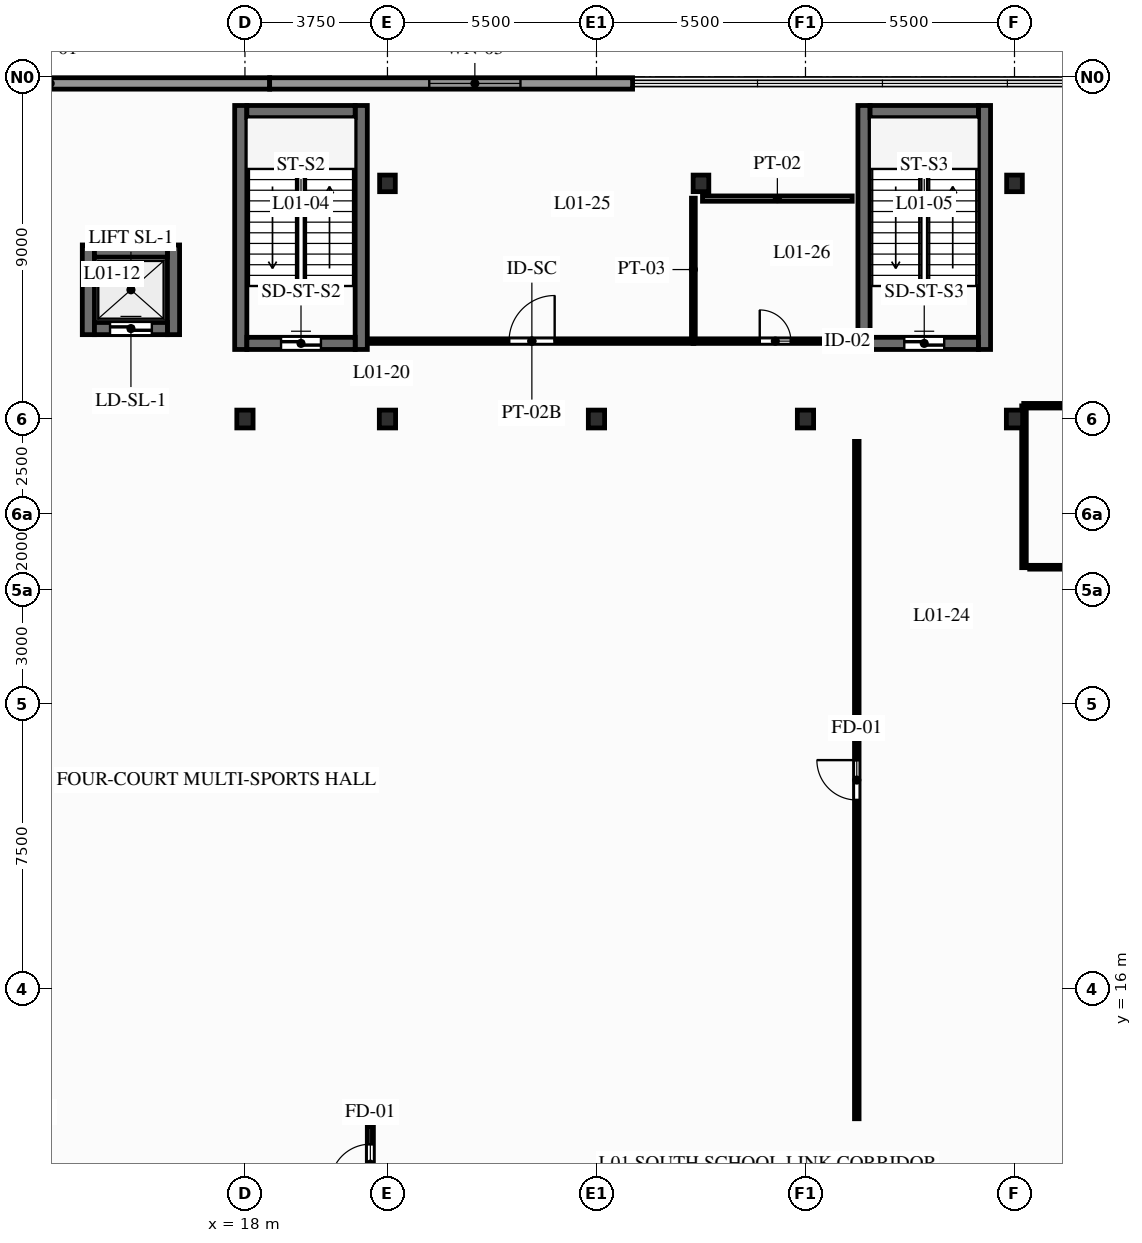
"""IFC4 building model, lengths in metres.
Left out: names, types, materials, properties, quantities, classifications, styles, units other than length and angle.
Written with IfcOpenShell. Run it as: python <this file> out.ifc"""

import sys

from ifc_helpers import new_model, si_unit, direction, frame, frame_2d, origin, origin_2d, place, context, subcontext, project, spatial, rectangle, i_section, extrude, element, fill, save


model = new_model("IFC4")
c1 = context("Model", 3, precision=1e-05, world=origin(), true_north=direction((0.0, 1.0)))
c2 = subcontext(c1, "Body", "Model", "MODEL_VIEW")
j1 = project(units=[si_unit("LENGTHUNIT", "METRE"), si_unit("PLANEANGLEUNIT", "RADIAN")], contexts=[c1])
p1 = place(None, origin())
s1 = spatial("IfcSite", under=j1, at=p1, CompositionType="ELEMENT")
p2 = place(p1, origin())
s2 = spatial("IfcBuilding", under=s1, at=p2, CompositionType="ELEMENT")
p3 = place(p2, frame((0.0, 0.0, 4.5)))
s3 = spatial("IfcBuildingStorey", under=s2, at=p3, CompositionType="ELEMENT", Elevation=4.5)
for number, where, z_axis, x_axis in (
    (1, (18.0, 31.0, 0.0), (0.0, 0.0, 1.0), (1.0, 0.0, 0.0)),
    (2, (21.75, 31.0, 0.0), (0.0, 0.0, 1.0), (1.0, 0.0, 0.0)),
):
    element("IfcColumn", number, at=place(p3, frame(where, z_axis=z_axis, x_axis=x_axis)), inside=s3, PredefinedType="COLUMN", context=c2, shape_type="SweptSolid", body=[
        extrude(i_section(OverallWidth=0.428, OverallDepth=0.469, WebThickness=0.078, FlangeThickness=0.125, FilletRadius=0.015, at=origin_2d()), origin(), (0.0, 0.0, 1.0), 4.5),
    ])
p4 = place(p3, frame((21.75, 37.2, 0.0), z_axis=(0.0, 0.0, 1.0), x_axis=(1.0, 0.0, 0.0)))
e3 = element("IfcColumn", 3, at=p4, inside=s3, PredefinedType="COLUMN", context=c2, shape_type="SweptSolid", body=[
    extrude(i_section(OverallWidth=0.412, OverallDepth=0.437, WebThickness=0.036, FlangeThickness=0.058, FilletRadius=0.015, at=origin_2d()), origin(), (0.0, 0.0, 1.0), 4.5),
])
p5 = place(p3, frame((27.25, 31.0, 0.0), z_axis=(0.0, 0.0, 1.0), x_axis=(1.0, 0.0, 0.0)))
e4 = element("IfcColumn", 4, at=p5, inside=s3, PredefinedType="COLUMN", context=c2, shape_type="SweptSolid", body=[
    extrude(i_section(OverallWidth=0.428, OverallDepth=0.469, WebThickness=0.078, FlangeThickness=0.125, FilletRadius=0.015, at=origin_2d()), origin(), (0.0, 0.0, 1.0), 4.5),
])
p6 = place(p3, frame((30.0, 37.2, 0.0), z_axis=(0.0, 0.0, 1.0), x_axis=(1.0, 0.0, 0.0)))
e5 = element("IfcColumn", 5, at=p6, inside=s3, PredefinedType="COLUMN", context=c2, shape_type="SweptSolid", body=[
    extrude(i_section(OverallWidth=0.412, OverallDepth=0.437, WebThickness=0.036, FlangeThickness=0.058, FilletRadius=0.015, at=origin_2d()), origin(), (0.0, 0.0, 1.0), 4.5),
])
for number, where, z_axis, x_axis in (
    (6, (32.75, 31.0, 0.0), (0.0, 0.0, 1.0), (1.0, 0.0, 0.0)),
    (7, (38.25, 31.0, 0.0), (0.0, 0.0, 1.0), (1.0, 0.0, 0.0)),
):
    element("IfcColumn", number, at=place(p3, frame(where, z_axis=z_axis, x_axis=x_axis)), inside=s3, PredefinedType="COLUMN", context=c2, shape_type="SweptSolid", body=[
        extrude(i_section(OverallWidth=0.428, OverallDepth=0.469, WebThickness=0.078, FlangeThickness=0.125, FilletRadius=0.015, at=origin_2d()), origin(), (0.0, 0.0, 1.0), 4.5),
    ])
p7 = place(p3, frame((38.25, 37.2, 0.0), z_axis=(0.0, 0.0, 1.0), x_axis=(1.0, 0.0, 0.0)))
e8 = element("IfcColumn", 8, at=p7, inside=s3, PredefinedType="COLUMN", context=c2, shape_type="SweptSolid", body=[
    extrude(i_section(OverallWidth=0.412, OverallDepth=0.437, WebThickness=0.036, FlangeThickness=0.058, FilletRadius=0.015, at=origin_2d()), origin(), (0.0, 0.0, 1.0), 4.5),
])
p8 = place(p3, frame((7.1, 39.83, 0.0), z_axis=(0.0, 0.0, 1.0), x_axis=(1.0, 0.0, 0.0)))
e9 = element("IfcWall", 9, at=p8, inside=s3, PredefinedType="STANDARD", context=c2, shape_type="SweptSolid", body=[
    extrude(rectangle(XDim=11.55, YDim=0.3, at=frame_2d((5.775, 0.0))), origin(), (0.0, 0.0, 1.0), 4.22),
])
p9 = place(p3, frame((18.65, 39.83, 0.0), z_axis=(0.0, 0.0, 1.0), x_axis=(1.0, 0.0, 0.0)))
e10 = element("IfcWall", 10, at=p9, inside=s3, PredefinedType="STANDARD", context=c2, shape_type="SweptSolid", body=[
    extrude(rectangle(XDim=9.55, YDim=0.3, at=frame_2d((4.775, 0.0))), origin(), (0.0, 0.0, 1.0), 4.22),
])
p10 = place(p9, frame((4.2, 0.0, 0.9)))
e11 = element("IfcOpeningElement", 11, at=p10, cuts=e10, PredefinedType="OPENING", context=c2, shape_type="SweptSolid", body=[
    extrude(rectangle(XDim=2.4, YDim=2.15, at=frame_2d((1.2, 1.075))), frame((0.0, 0.16, 0.0), z_axis=(0.0, -1.0, 0.0), x_axis=(1.0, 0.0, 0.0)), (0.0, 0.0, 1.0), 0.32),
])
for number, where, z_axis, x_axis in (
    (12, (17.89, 32.83, 0.0), (0.0, 0.0, 1.0), (0.0, 1.0, 0.0)),
    (13, (21.06, 32.83, 0.0), (0.0, 0.0, 1.0), (0.0, 1.0, 0.0)),
):
    element("IfcWall", number, at=place(p3, frame(where, z_axis=z_axis, x_axis=x_axis)), inside=s3, PredefinedType="SHEAR", context=c2, shape_type="SweptSolid", body=[
        extrude(rectangle(XDim=6.42, YDim=0.32, at=frame_2d((3.21, 0.0))), origin(), (0.0, 0.0, 1.0), 4.22),
    ])
p11 = place(p3, frame((18.05, 32.99, 0.0), z_axis=(0.0, 0.0, 1.0), x_axis=(1.0, 0.0, 0.0)))
e14 = element("IfcWall", 14, at=p11, inside=s3, PredefinedType="SHEAR", context=c2, shape_type="SweptSolid", body=[
    extrude(rectangle(XDim=2.85, YDim=0.32, at=frame_2d((1.425, 0.0))), origin(), (0.0, 0.0, 1.0), 4.22),
])
p12 = place(p11, frame((0.9, 0.0, 0.0)))
e15 = element("IfcOpeningElement", 15, at=p12, cuts=e14, PredefinedType="OPENING", context=c2, shape_type="SweptSolid", body=[
    extrude(rectangle(XDim=1.05, YDim=2.06, at=frame_2d((0.525, 1.03))), frame((0.0, 0.17, 0.0), z_axis=(0.0, -1.0, 0.0), x_axis=(1.0, 0.0, 0.0)), (0.0, 0.0, 1.0), 0.34),
])
p13 = place(p3, frame((20.9, 39.09, 0.0), z_axis=(0.0, 0.0, 1.0), x_axis=(-1.0, 0.0, 0.0)))
e16 = element("IfcWall", 16, at=p13, inside=s3, PredefinedType="SHEAR", context=c2, shape_type="SweptSolid", body=[
    extrude(rectangle(XDim=2.85, YDim=0.32, at=frame_2d((1.425, 0.0))), origin(), (0.0, 0.0, 1.0), 4.22),
])
for number, where, z_axis, x_axis in (
    (17, (34.29, 32.83, 0.0), (0.0, 0.0, 1.0), (0.0, 1.0, 0.0)),
    (18, (37.46, 32.83, 0.0), (0.0, 0.0, 1.0), (0.0, 1.0, 0.0)),
):
    element("IfcWall", number, at=place(p3, frame(where, z_axis=z_axis, x_axis=x_axis)), inside=s3, PredefinedType="SHEAR", context=c2, shape_type="SweptSolid", body=[
        extrude(rectangle(XDim=6.42, YDim=0.32, at=frame_2d((3.21, 0.0))), origin(), (0.0, 0.0, 1.0), 4.22),
    ])
p14 = place(p3, frame((34.45, 32.99, 0.0), z_axis=(0.0, 0.0, 1.0), x_axis=(1.0, 0.0, 0.0)))
e19 = element("IfcWall", 19, at=p14, inside=s3, PredefinedType="SHEAR", context=c2, shape_type="SweptSolid", body=[
    extrude(rectangle(XDim=2.85, YDim=0.32, at=frame_2d((1.425, 0.0))), origin(), (0.0, 0.0, 1.0), 4.22),
])
p15 = place(p14, frame((0.9, 0.0, 0.0)))
e20 = element("IfcOpeningElement", 20, at=p15, cuts=e19, PredefinedType="OPENING", context=c2, shape_type="SweptSolid", body=[
    extrude(rectangle(XDim=1.05, YDim=2.06, at=frame_2d((0.525, 1.03))), frame((0.0, 0.17, 0.0), z_axis=(0.0, -1.0, 0.0), x_axis=(1.0, 0.0, 0.0)), (0.0, 0.0, 1.0), 0.34),
])
p16 = place(p3, frame((37.3, 39.09, 0.0), z_axis=(0.0, 0.0, 1.0), x_axis=(-1.0, 0.0, 0.0)))
e21 = element("IfcWall", 21, at=p16, inside=s3, PredefinedType="SHEAR", context=c2, shape_type="SweptSolid", body=[
    extrude(rectangle(XDim=2.85, YDim=0.32, at=frame_2d((1.425, 0.0))), origin(), (0.0, 0.0, 1.0), 4.22),
])
for number, where, z_axis, x_axis in (
    (22, (13.88, 33.22, 0.0), (0.0, 0.0, 1.0), (0.0, 1.0, 0.0)),
    (23, (16.12, 33.22, 0.0), (0.0, 0.0, 1.0), (0.0, 1.0, 0.0)),
):
    element("IfcWall", number, at=place(p3, frame(where, z_axis=z_axis, x_axis=x_axis)), inside=s3, PredefinedType="SHEAR", context=c2, shape_type="SweptSolid", body=[
        extrude(rectangle(XDim=2.36, YDim=0.32, at=frame_2d((1.18, 0.0))), origin(), (0.0, 0.0, 1.0), 4.22),
    ])
p17 = place(p3, frame((14.04, 33.38, 0.0), z_axis=(0.0, 0.0, 1.0), x_axis=(1.0, 0.0, 0.0)))
e24 = element("IfcWall", 24, at=p17, inside=s3, PredefinedType="SHEAR", context=c2, shape_type="SweptSolid", body=[
    extrude(rectangle(XDim=1.92, YDim=0.32, at=frame_2d((0.96, 0.0))), origin(), (0.0, 0.0, 1.0), 4.22),
])
p18 = place(p17, frame((0.41, 0.0, 0.0)))
e25 = element("IfcOpeningElement", 25, at=p18, cuts=e24, PredefinedType="OPENING", context=c2, shape_type="SweptSolid", body=[
    extrude(rectangle(XDim=1.1, YDim=2.06, at=frame_2d((0.55, 1.03))), frame((0.0, 0.17, 0.0), z_axis=(0.0, -1.0, 0.0), x_axis=(1.0, 0.0, 0.0)), (0.0, 0.0, 1.0), 0.34),
])
p19 = place(p3, frame((14.04, 35.42, 0.0), z_axis=(0.0, 0.0, 1.0), x_axis=(1.0, 0.0, 0.0)))
e26 = element("IfcWall", 26, at=p19, inside=s3, PredefinedType="SHEAR", context=c2, shape_type="SweptSolid", body=[
    extrude(rectangle(XDim=1.92, YDim=0.32, at=frame_2d((0.96, 0.0))), origin(), (0.0, 0.0, 1.0), 4.22),
])
p20 = place(p3, frame((21.3, 10.389, 0.0), z_axis=(0.0, 0.0, 1.0), x_axis=(0.0, 1.0, 0.0)))
e27 = element("IfcWall", 27, at=p20, inside=s3, PredefinedType="PARTITIONING", context=c2, shape_type="SweptSolid", body=[
    extrude(rectangle(XDim=2.011, YDim=0.16, at=frame_2d((1.006, 0.0))), origin(), (0.0, 0.0, 1.0), 4.22),
])
p21 = place(p20, frame((0.481, 0.0, 0.0)))
e28 = element("IfcOpeningElement", 28, at=p21, cuts=e27, PredefinedType="OPENING", context=c2, shape_type="SweptSolid", body=[
    extrude(rectangle(XDim=1.05, YDim=2.06, at=frame_2d((0.525, 1.03))), frame((0.0, 0.09, 0.0), z_axis=(0.0, -1.0, 0.0), x_axis=(1.0, 0.0, 0.0)), (0.0, 0.0, 1.0), 0.18),
])
p22 = place(p3, frame((21.289, 33.05, 0.0), z_axis=(0.0, 0.0, 1.0), x_axis=(1.0, 0.0, 0.0)))
e29 = element("IfcWall", 29, at=p22, inside=s3, PredefinedType="PARTITIONING", context=c2, shape_type="SweptSolid", body=[
    extrude(rectangle(XDim=8.522, YDim=0.12, at=frame_2d((4.261, 0.0))), origin(), (0.0, 0.0, 1.0), 3.268),
])
p23 = place(p22, frame((3.661, 0.0, 0.0)))
e30 = element("IfcOpeningElement", 30, at=p23, cuts=e29, PredefinedType="OPENING", context=c2, shape_type="SweptSolid", body=[
    extrude(rectangle(XDim=1.2, YDim=2.08, at=frame_2d((0.6, 1.04))), frame((0.0, 0.07, 0.0), z_axis=(0.0, -1.0, 0.0), x_axis=(1.0, 0.0, 0.0)), (0.0, 0.0, 1.0), 0.14),
])
p24 = place(p3, frame((29.793, 33.05, 0.0), z_axis=(0.0, 0.0, 1.0), x_axis=(1.0, 0.0, 0.0)))
e31 = element("IfcWall", 31, at=p24, inside=s3, PredefinedType="PARTITIONING", context=c2, shape_type="SweptSolid", body=[
    extrude(rectangle(XDim=4.327, YDim=0.12, at=frame_2d((2.164, 0.0))), origin(), (0.0, 0.0, 1.0), 4.22),
])
p25 = place(p24, frame((1.754, 0.0, 0.0)))
e32 = element("IfcOpeningElement", 32, at=p25, cuts=e31, PredefinedType="OPENING", context=c2, shape_type="SweptSolid", body=[
    extrude(rectangle(XDim=0.82, YDim=2.02, at=frame_2d((0.41, 1.01))), frame((0.0, 0.07, 0.0), z_axis=(0.0, -1.0, 0.0), x_axis=(1.0, 0.0, 0.0)), (0.0, 0.0, 1.0), 0.14),
])
p26 = place(p3, frame((38.493, 31.35, 0.0), z_axis=(0.0, 0.0, 1.0), x_axis=(1.0, 0.0, 0.0)))
e33 = element("IfcWall", 33, at=p26, inside=s3, PredefinedType="PARTITIONING", context=c2, shape_type="SweptSolid", body=[
    extrude(rectangle(XDim=21.319, YDim=0.12, at=frame_2d((10.659, 0.0))), origin(), (0.0, 0.0, 1.0), 3.268),
])
p27 = place(p26, frame((10.059, 0.0, 0.0)))
e34 = element("IfcOpeningElement", 34, at=p27, cuts=e33, PredefinedType="OPENING", context=c2, shape_type="SweptSolid", body=[
    extrude(rectangle(XDim=1.2, YDim=2.08, at=frame_2d((0.6, 1.04))), frame((0.0, 0.07, 0.0), z_axis=(0.0, -1.0, 0.0), x_axis=(1.0, 0.0, 0.0)), (0.0, 0.0, 1.0), 0.14),
])
p28 = place(p3, frame((34.1, 12.589, 0.0), z_axis=(0.0, 0.0, 1.0), x_axis=(0.0, 1.0, 0.0)))
e35 = element("IfcWall", 35, at=p28, inside=s3, PredefinedType="PARTITIONING", context=c2, shape_type="SweptSolid", body=[
    extrude(rectangle(XDim=17.823, YDim=0.12, at=frame_2d((8.911, 0.0))), origin(), (0.0, 0.0, 1.0), 4.22),
])
p29 = place(p28, frame((8.386, 0.0, 0.0)))
e36 = element("IfcOpeningElement", 36, at=p29, cuts=e35, PredefinedType="OPENING", context=c2, shape_type="SweptSolid", body=[
    extrude(rectangle(XDim=1.05, YDim=2.06, at=frame_2d((0.525, 1.03))), frame((0.0, 0.07, 0.0), z_axis=(0.0, -1.0, 0.0), x_axis=(1.0, 0.0, 0.0)), (0.0, 0.0, 1.0), 0.14),
])
p30 = place(p3, frame((38.5, 27.089, 0.0), z_axis=(0.0, 0.0, 1.0), x_axis=(0.0, 1.0, 0.0)))
e37 = element("IfcWall", 37, at=p30, inside=s3, PredefinedType="PARTITIONING", context=c2, shape_type="SweptSolid", body=[
    extrude(rectangle(XDim=4.257, YDim=0.12, at=frame_2d((2.129, 0.0))), origin(), (0.0, 0.0, 1.0), 3.268),
])
p31 = place(p3, frame((29.8, 33.054, 0.0), z_axis=(0.0, 0.0, 1.0), x_axis=(0.0, 1.0, 0.0)))
e38 = element("IfcWall", 38, at=p31, inside=s3, PredefinedType="PARTITIONING", context=c2, shape_type="SweptSolid", body=[
    extrude(rectangle(XDim=3.757, YDim=0.1, at=frame_2d((1.879, 0.0))), origin(), (0.0, 0.0, 1.0), 3.738),
])
p32 = place(p3, frame((38.65, 27.1, 0.0), z_axis=(0.0, 0.0, 1.0), x_axis=(1.0, 0.0, 0.0)))
e39 = element("IfcWall", 39, at=p32, inside=s3, PredefinedType="PARTITIONING", context=c2, shape_type="SweptSolid", body=[
    extrude(rectangle(XDim=20.85, YDim=0.1, at=frame_2d((10.425, 0.0))), origin(), (0.0, 0.0, 1.0), 4.22),
])
p33 = place(p32, frame((10.015, 0.0, 0.0)))
e40 = element("IfcOpeningElement", 40, at=p33, cuts=e39, PredefinedType="OPENING", context=c2, shape_type="SweptSolid", body=[
    extrude(rectangle(XDim=0.82, YDim=2.02, at=frame_2d((0.41, 1.01))), frame((0.0, 0.06, 0.0), z_axis=(0.0, -1.0, 0.0), x_axis=(1.0, 0.0, 0.0)), (0.0, 0.0, 1.0), 0.12),
])
p34 = place(p3, frame((30.04, 36.8, 0.0), z_axis=(0.0, 0.0, 1.0), x_axis=(1.0, 0.0, 0.0)))
e41 = element("IfcWall", 41, at=p34, inside=s3, PredefinedType="PARTITIONING", context=c2, shape_type="SweptSolid", body=[
    extrude(rectangle(XDim=3.94, YDim=0.14, at=frame_2d((1.97, 0.0))), origin(), (0.0, 0.0, 1.0), 4.22),
])
p35 = place(p10, origin())
e42 = element("IfcWindow", 42, at=p35, inside=s3, PartitioningType="SINGLE_PANEL", PredefinedType="WINDOW", context=c2, shape_type="SweptSolid", body=[
    extrude(rectangle(XDim=2.4, YDim=2.15, at=frame_2d((1.2, 1.075))), frame((0.0, 0.03, 0.0), z_axis=(0.0, -1.0, 0.0), x_axis=(1.0, 0.0, 0.0)), (0.0, 0.0, 1.0), 0.06),
])
fill(e11, e42)
p36 = place(p12, origin())
e43 = element("IfcDoor", 43, at=p36, inside=s3, OperationType="SINGLE_SWING_RIGHT", PredefinedType="DOOR", context=c2, shape_type="SweptSolid", body=[
    extrude(rectangle(XDim=1.05, YDim=2.06, at=frame_2d((0.525, 1.03))), frame((0.0, 0.025, 0.0), z_axis=(0.0, -1.0, 0.0), x_axis=(1.0, 0.0, 0.0)), (0.0, 0.0, 1.0), 0.05),
])
fill(e15, e43)
p37 = place(p15, origin())
e44 = element("IfcDoor", 44, at=p37, inside=s3, OperationType="SINGLE_SWING_RIGHT", PredefinedType="DOOR", context=c2, shape_type="SweptSolid", body=[
    extrude(rectangle(XDim=1.05, YDim=2.06, at=frame_2d((0.525, 1.03))), frame((0.0, 0.025, 0.0), z_axis=(0.0, -1.0, 0.0), x_axis=(1.0, 0.0, 0.0)), (0.0, 0.0, 1.0), 0.05),
])
fill(e20, e44)
p38 = place(p18, origin())
e45 = element("IfcDoor", 45, at=p38, inside=s3, OperationType="SLIDING_TO_LEFT", PredefinedType="DOOR", context=c2, shape_type="SweptSolid", body=[
    extrude(rectangle(XDim=1.1, YDim=2.06, at=frame_2d((0.55, 1.03))), frame((0.0, 0.025, 0.0), z_axis=(0.0, -1.0, 0.0), x_axis=(1.0, 0.0, 0.0)), (0.0, 0.0, 1.0), 0.05),
])
fill(e25, e45)
p39 = place(p21, origin())
e46 = element("IfcDoor", 46, at=p39, inside=s3, OperationType="SINGLE_SWING_LEFT", PredefinedType="DOOR", context=c2, shape_type="SweptSolid", body=[
    extrude(rectangle(XDim=1.05, YDim=2.06, at=frame_2d((0.525, 1.03))), frame((0.0, 0.025, 0.0), z_axis=(0.0, -1.0, 0.0), x_axis=(1.0, 0.0, 0.0)), (0.0, 0.0, 1.0), 0.05),
])
fill(e28, e46)
p40 = place(p23, origin())
e47 = element("IfcDoor", 47, at=p40, inside=s3, OperationType="SINGLE_SWING_RIGHT", PredefinedType="DOOR", context=c2, shape_type="SweptSolid", body=[
    extrude(rectangle(XDim=1.2, YDim=2.08, at=frame_2d((0.6, 1.04))), frame((0.0, 0.025, 0.0), z_axis=(0.0, -1.0, 0.0), x_axis=(1.0, 0.0, 0.0)), (0.0, 0.0, 1.0), 0.05),
])
fill(e30, e47)
p41 = place(p25, origin())
e48 = element("IfcDoor", 48, at=p41, inside=s3, OperationType="SINGLE_SWING_LEFT", PredefinedType="DOOR", context=c2, shape_type="SweptSolid", body=[
    extrude(rectangle(XDim=0.82, YDim=2.02, at=frame_2d((0.41, 1.01))), frame((0.0, 0.025, 0.0), z_axis=(0.0, -1.0, 0.0), x_axis=(1.0, 0.0, 0.0)), (0.0, 0.0, 1.0), 0.05),
])
fill(e32, e48)
p42 = place(p29, origin())
e49 = element("IfcDoor", 49, at=p42, inside=s3, OperationType="SINGLE_SWING_RIGHT", PredefinedType="DOOR", context=c2, shape_type="SweptSolid", body=[
    extrude(rectangle(XDim=1.05, YDim=2.06, at=frame_2d((0.525, 1.03))), frame((0.0, 0.025, 0.0), z_axis=(0.0, -1.0, 0.0), x_axis=(1.0, 0.0, 0.0)), (0.0, 0.0, 1.0), 0.05),
])
fill(e36, e49)
save(model, sys.argv[1])
